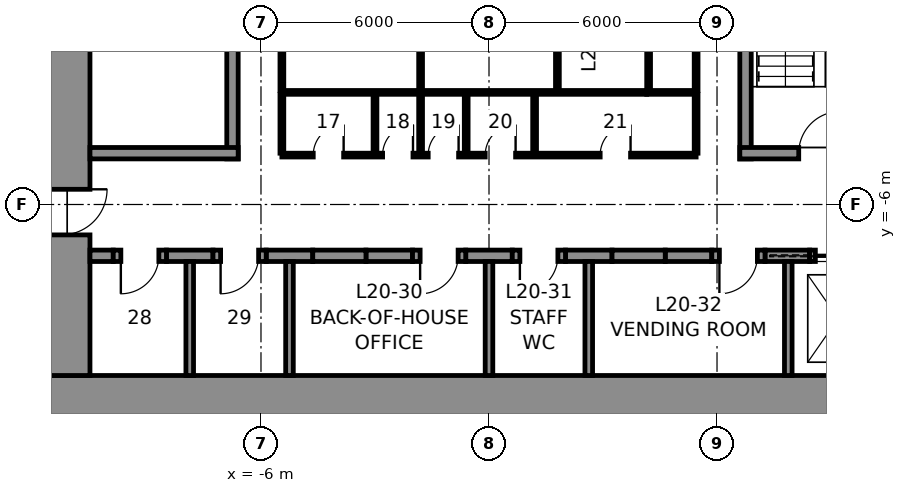
"""IFC4 building model, lengths in metres.
Left out: names, types, materials, properties, quantities, classifications, styles, units other than length and angle.
Written with IfcOpenShell. Run it as: python <this file> out.ifc"""

import sys

from ifc_helpers import new_model, si_unit, direction, frame, frame_2d, origin, place, context, subcontext, project, spatial, rectangle, extrude, element, fill, save


model = new_model("IFC4")
c1 = context("Model", 3, precision=1e-05, world=origin(), true_north=direction((0.0, 1.0)))
c2 = subcontext(c1, "Body", "Model", "MODEL_VIEW")
j1 = project(units=[si_unit("LENGTHUNIT", "METRE"), si_unit("PLANEANGLEUNIT", "RADIAN")], contexts=[c1])
p1 = place(None, origin())
s1 = spatial("IfcSite", under=j1, at=p1, CompositionType="ELEMENT")
p2 = place(p1, origin())
s2 = spatial("IfcBuilding", under=s1, at=p2, CompositionType="ELEMENT")
p3 = place(p2, frame((0.0, 0.0, 104.4)))
s3 = spatial("IfcBuildingStorey", under=s2, at=p3, CompositionType="ELEMENT", Elevation=104.4)
p4 = place(p3, frame((12.0, -11.25, 0.0), z_axis=(0.0, 0.0, 1.0), x_axis=(-1.0, 0.0, 0.0)))
e1 = element("IfcWall", 1, at=p4, inside=s3, PredefinedType="SHEAR", context=c2, shape_type="SweptSolid", body=[
    extrude(rectangle(XDim=24.0, YDim=1.5, at=frame_2d((12.0, 0.0))), origin(), (0.0, 0.0, 1.0), 4.6),
])
p5 = place(p3, frame((-11.25, -10.5, 0.0), z_axis=(0.0, 0.0, 1.0), x_axis=(0.0, 1.0, 0.0)))
e2 = element("IfcWall", 2, at=p5, inside=s3, PredefinedType="SHEAR", context=c2, shape_type="SweptSolid", body=[
    extrude(rectangle(XDim=21.0, YDim=1.5, at=frame_2d((10.5, 0.0))), origin(), (0.0, 0.0, 1.0), 4.6),
])
p6 = place(p5, frame((16.1, 0.0, 0.0)))
e3 = element("IfcOpeningElement", 3, at=p6, cuts=e2, PredefinedType="OPENING", context=c2, shape_type="SweptSolid", body=[
    extrude(rectangle(XDim=1.2, YDim=2.3, at=frame_2d((0.6, 1.15))), frame((0.0, 0.76, 0.0), z_axis=(0.0, -1.0, 0.0), x_axis=(1.0, 0.0, 0.0)), (0.0, 0.0, 1.0), 1.52),
])
p7 = place(p5, frame((3.7, 0.0, 0.0)))
e4 = element("IfcOpeningElement", 4, at=p7, cuts=e2, PredefinedType="OPENING", context=c2, shape_type="SweptSolid", body=[
    extrude(rectangle(XDim=1.2, YDim=2.3, at=frame_2d((0.6, 1.15))), frame((0.0, 0.76, 0.0), z_axis=(0.0, -1.0, 0.0), x_axis=(1.0, 0.0, 0.0)), (0.0, 0.0, 1.0), 1.52),
])
p8 = place(p3, frame((-10.5, -7.35, 0.0), z_axis=(0.0, 0.0, 1.0), x_axis=(1.0, 0.0, 0.0)))
e5 = element("IfcWall", 5, at=p8, inside=s3, PredefinedType="SHEAR", context=c2, shape_type="SweptSolid", body=[
    extrude(rectangle(XDim=0.613, YDim=0.3, at=frame_2d((0.306, 0.0))), origin(), (0.0, 0.0, 1.0), 4.6),
])
for number, where, z_axis, x_axis in (
    (6, (-8.488, -7.35, 0.0), (0.0, 0.0, 1.0), (1.0, 0.0, 0.0)),
    (7, (-5.863, -7.35, 0.0), (0.0, 0.0, 1.0), (1.0, 0.0, 0.0)),
    (8, (-3.238, -7.35, 0.0), (0.0, 0.0, 1.0), (1.0, 0.0, 0.0)),
    (9, (-0.613, -7.35, 0.0), (0.0, 0.0, 1.0), (1.0, 0.0, 0.0)),
    (10, (2.012, -7.35, 0.0), (0.0, 0.0, 1.0), (1.0, 0.0, 0.0)),
    (11, (4.637, -7.35, 0.0), (0.0, 0.0, 1.0), (1.0, 0.0, 0.0)),
):
    element("IfcWall", number, at=place(p3, frame(where, z_axis=z_axis, x_axis=x_axis)), inside=s3, PredefinedType="SHEAR", context=c2, shape_type="SweptSolid", body=[
        extrude(rectangle(XDim=1.225, YDim=0.3, at=frame_2d((0.613, 0.0))), origin(), (0.0, 0.0, 1.0), 4.6),
    ])
p9 = place(p3, frame((7.262, -7.35, 0.0), z_axis=(0.0, 0.0, 1.0), x_axis=(1.0, 0.0, 0.0)))
e12 = element("IfcWall", 12, at=p9, inside=s3, PredefinedType="SHEAR", context=c2, shape_type="SweptSolid", body=[
    extrude(rectangle(XDim=1.175, YDim=0.3, at=frame_2d((0.587, 0.0))), origin(), (0.0, 0.0, 1.0), 4.6),
])
p10 = place(p3, frame((-9.887, -7.35, 0.0), z_axis=(0.0, 0.0, 1.0), x_axis=(1.0, 0.0, 0.0)))
e13 = element("IfcWall", 13, at=p10, inside=s3, PredefinedType="PARTITIONING", context=c2, shape_type="SweptSolid", body=[
    extrude(rectangle(XDim=1.4, YDim=0.3, at=frame_2d((0.7, 0.0))), origin(), (0.0, 0.0, 1.0), 4.6),
])
p11 = place(p10, frame((0.2, 0.0, 0.0)))
e14 = element("IfcOpeningElement", 14, at=p11, cuts=e13, PredefinedType="OPENING", context=c2, shape_type="SweptSolid", body=[
    extrude(rectangle(XDim=1.0, YDim=2.3, at=frame_2d((0.5, 1.15))), frame((0.0, 0.16, 0.0), z_axis=(0.0, -1.0, 0.0), x_axis=(1.0, 0.0, 0.0)), (0.0, 0.0, 1.0), 0.32),
])
p12 = place(p3, frame((-7.262, -7.35, 0.0), z_axis=(0.0, 0.0, 1.0), x_axis=(1.0, 0.0, 0.0)))
e15 = element("IfcWall", 15, at=p12, inside=s3, PredefinedType="PARTITIONING", context=c2, shape_type="SweptSolid", body=[
    extrude(rectangle(XDim=1.4, YDim=0.3, at=frame_2d((0.7, 0.0))), origin(), (0.0, 0.0, 1.0), 4.6),
])
p13 = place(p12, frame((0.2, 0.0, 0.0)))
e16 = element("IfcOpeningElement", 16, at=p13, cuts=e15, PredefinedType="OPENING", context=c2, shape_type="SweptSolid", body=[
    extrude(rectangle(XDim=1.0, YDim=2.3, at=frame_2d((0.5, 1.15))), frame((0.0, 0.16, 0.0), z_axis=(0.0, -1.0, 0.0), x_axis=(1.0, 0.0, 0.0)), (0.0, 0.0, 1.0), 0.32),
])
p14 = place(p3, frame((-4.637, -7.35, 0.0), z_axis=(0.0, 0.0, 1.0), x_axis=(1.0, 0.0, 0.0)))
e17 = element("IfcWall", 17, at=p14, inside=s3, PredefinedType="PARTITIONING", context=c2, shape_type="SweptSolid", body=[
    extrude(rectangle(XDim=1.4, YDim=0.3, at=frame_2d((0.7, 0.0))), origin(), (0.0, 0.0, 1.0), 4.6),
])
p15 = place(p3, frame((-2.012, -7.35, 0.0), z_axis=(0.0, 0.0, 1.0), x_axis=(1.0, 0.0, 0.0)))
e18 = element("IfcWall", 18, at=p15, inside=s3, PredefinedType="PARTITIONING", context=c2, shape_type="SweptSolid", body=[
    extrude(rectangle(XDim=1.4, YDim=0.3, at=frame_2d((0.7, 0.0))), origin(), (0.0, 0.0, 1.0), 4.6),
])
p16 = place(p15, frame((0.2, 0.0, 0.0)))
e19 = element("IfcOpeningElement", 19, at=p16, cuts=e18, PredefinedType="OPENING", context=c2, shape_type="SweptSolid", body=[
    extrude(rectangle(XDim=1.0, YDim=2.3, at=frame_2d((0.5, 1.15))), frame((0.0, 0.16, 0.0), z_axis=(0.0, -1.0, 0.0), x_axis=(1.0, 0.0, 0.0)), (0.0, 0.0, 1.0), 0.32),
])
p17 = place(p3, frame((0.613, -7.35, 0.0), z_axis=(0.0, 0.0, 1.0), x_axis=(1.0, 0.0, 0.0)))
e20 = element("IfcWall", 20, at=p17, inside=s3, PredefinedType="PARTITIONING", context=c2, shape_type="SweptSolid", body=[
    extrude(rectangle(XDim=1.4, YDim=0.3, at=frame_2d((0.7, 0.0))), origin(), (0.0, 0.0, 1.0), 4.6),
])
p18 = place(p17, frame((0.2, 0.0, 0.0)))
e21 = element("IfcOpeningElement", 21, at=p18, cuts=e20, PredefinedType="OPENING", context=c2, shape_type="SweptSolid", body=[
    extrude(rectangle(XDim=1.0, YDim=2.3, at=frame_2d((0.5, 1.15))), frame((0.0, 0.16, 0.0), z_axis=(0.0, -1.0, 0.0), x_axis=(1.0, 0.0, 0.0)), (0.0, 0.0, 1.0), 0.32),
])
p19 = place(p3, frame((3.238, -7.35, 0.0), z_axis=(0.0, 0.0, 1.0), x_axis=(1.0, 0.0, 0.0)))
e22 = element("IfcWall", 22, at=p19, inside=s3, PredefinedType="PARTITIONING", context=c2, shape_type="SweptSolid", body=[
    extrude(rectangle(XDim=1.4, YDim=0.3, at=frame_2d((0.7, 0.0))), origin(), (0.0, 0.0, 1.0), 4.6),
])
p20 = place(p3, frame((5.863, -7.35, 0.0), z_axis=(0.0, 0.0, 1.0), x_axis=(1.0, 0.0, 0.0)))
e23 = element("IfcWall", 23, at=p20, inside=s3, PredefinedType="PARTITIONING", context=c2, shape_type="SweptSolid", body=[
    extrude(rectangle(XDim=1.4, YDim=0.3, at=frame_2d((0.7, 0.0))), origin(), (0.0, 0.0, 1.0), 4.6),
])
p21 = place(p20, frame((0.2, 0.0, 0.0)))
e24 = element("IfcOpeningElement", 24, at=p21, cuts=e23, PredefinedType="OPENING", context=c2, shape_type="SweptSolid", body=[
    extrude(rectangle(XDim=1.0, YDim=2.3, at=frame_2d((0.5, 1.15))), frame((0.0, 0.16, 0.0), z_axis=(0.0, -1.0, 0.0), x_axis=(1.0, 0.0, 0.0)), (0.0, 0.0, 1.0), 0.32),
])
p22 = place(p3, frame((8.438, -7.35, 0.0), z_axis=(0.0, 0.0, 1.0), x_axis=(1.0, 0.0, 0.0)))
e25 = element("IfcWall", 25, at=p22, inside=s3, PredefinedType="PARTITIONING", context=c2, shape_type="SweptSolid", body=[
    extrude(rectangle(XDim=1.5, YDim=0.3, at=frame_2d((0.75, 0.0))), origin(), (0.0, 0.0, 1.0), 4.6),
])
p23 = place(p22, frame((0.15, 0.0, 0.0)))
e26 = element("IfcOpeningElement", 26, at=p23, cuts=e25, PredefinedType="OPENING", context=c2, shape_type="SweptSolid", body=[
    extrude(rectangle(XDim=1.2, YDim=2.3, at=frame_2d((0.6, 1.15))), frame((0.0, 0.16, 0.0), z_axis=(0.0, -1.0, 0.0), x_axis=(1.0, 0.0, 0.0)), (0.0, 0.0, 1.0), 0.32),
])
for number, where, z_axis, x_axis in (
    (27, (-7.875, -10.5, 0.0), (0.0, 0.0, 1.0), (0.0, 1.0, 0.0)),
    (28, (-5.25, -10.5, 0.0), (0.0, 0.0, 1.0), (0.0, 1.0, 0.0)),
    (29, (0.0, -10.5, 0.0), (0.0, 0.0, 1.0), (0.0, 1.0, 0.0)),
    (30, (2.625, -10.5, 0.0), (0.0, 0.0, 1.0), (0.0, 1.0, 0.0)),
    (31, (7.875, -10.5, 0.0), (0.0, 0.0, 1.0), (0.0, 1.0, 0.0)),
):
    element("IfcWall", number, at=place(p3, frame(where, z_axis=z_axis, x_axis=x_axis)), inside=s3, PredefinedType="PARTITIONING", context=c2, shape_type="SweptSolid", body=[
        extrude(rectangle(XDim=3.0, YDim=0.2, at=frame_2d((1.5, 0.0))), origin(), (0.0, 0.0, 1.0), 4.6),
    ])
p24 = place(p3, frame((-6.75, -4.8, 0.0), z_axis=(0.0, 0.0, 1.0), x_axis=(0.0, 1.0, 0.0)))
e32 = element("IfcWall", 32, at=p24, inside=s3, PredefinedType="SOLIDWALL", context=c2, shape_type="SweptSolid", body=[
    extrude(rectangle(XDim=9.6, YDim=0.3, at=frame_2d((4.8, 0.0))), origin(), (0.0, 0.0, 1.0), 4.35),
])
p25 = place(p3, frame((-6.6, -4.65, 0.0), z_axis=(0.0, 0.0, 1.0), x_axis=(-1.0, 0.0, 0.0)))
e33 = element("IfcWall", 33, at=p25, inside=s3, PredefinedType="SOLIDWALL", context=c2, shape_type="SweptSolid", body=[
    extrude(rectangle(XDim=3.9, YDim=0.3, at=frame_2d((1.95, 0.0))), origin(), (0.0, 0.0, 1.0), 4.35),
])
p26 = place(p3, frame((6.75, -4.8, 0.0), z_axis=(0.0, 0.0, 1.0), x_axis=(0.0, 1.0, 0.0)))
e34 = element("IfcWall", 34, at=p26, inside=s3, PredefinedType="SOLIDWALL", context=c2, shape_type="SweptSolid", body=[
    extrude(rectangle(XDim=9.6, YDim=0.3, at=frame_2d((4.8, 0.0))), origin(), (0.0, 0.0, 1.0), 4.35),
])
p27 = place(p3, frame((10.5, -4.65, 0.0), z_axis=(0.0, 0.0, 1.0), x_axis=(-1.0, 0.0, 0.0)))
e35 = element("IfcWall", 35, at=p27, inside=s3, PredefinedType="SOLIDWALL", context=c2, shape_type="SweptSolid", body=[
    extrude(rectangle(XDim=3.9, YDim=0.3, at=frame_2d((1.95, 0.0))), origin(), (0.0, 0.0, 1.0), 4.35),
])
p28 = place(p27, frame((1.25, 0.0, 0.0)))
e36 = element("IfcOpeningElement", 36, at=p28, cuts=e35, PredefinedType="OPENING", context=c2, shape_type="SweptSolid", body=[
    extrude(rectangle(XDim=1.1, YDim=2.3, at=frame_2d((0.55, 1.15))), frame((0.0, 0.16, 0.0), z_axis=(0.0, -1.0, 0.0), x_axis=(1.0, 0.0, 0.0)), (0.0, 0.0, 1.0), 0.32),
])
p29 = place(p3, frame((4.15, -3.05, 0.0), z_axis=(0.0, 0.0, 1.0), x_axis=(-1.0, 0.0, 0.0)))
e37 = element("IfcWall", 37, at=p29, inside=s3, PredefinedType="PARTITIONING", context=c2, shape_type="SweptSolid", body=[
    extrude(rectangle(XDim=9.6, YDim=0.1, at=frame_2d((4.8, 0.0))), origin(), (0.0, 0.0, 1.0), 4.35),
])
p30 = place(p3, frame((5.45, -3.05, 0.0), z_axis=(0.0, 0.0, 1.0), x_axis=(-1.0, 0.0, 0.0)))
e38 = element("IfcWall", 38, at=p30, inside=s3, PredefinedType="PARTITIONING", context=c2, shape_type="SweptSolid", body=[
    extrude(rectangle(XDim=1.3, YDim=0.1, at=frame_2d((0.65, 0.0))), origin(), (0.0, 0.0, 1.0), 4.35),
])
for number, where, z_axis, x_axis in (
    (39, (5.45, 3.0, 0.0), (0.0, 0.0, 1.0), (0.0, -1.0, 0.0)),
    (40, (-5.45, -3.0, 0.0), (0.0, 0.0, 1.0), (0.0, 1.0, 0.0)),
    (41, (-1.8, -3.0, 0.0), (0.0, 0.0, 1.0), (0.0, 1.0, 0.0)),
    (42, (1.8, -3.0, 0.0), (0.0, 0.0, 1.0), (0.0, 1.0, 0.0)),
    (43, (4.2, -3.0, 0.0), (0.0, 0.0, 1.0), (0.0, 1.0, 0.0)),
):
    element("IfcWall", number, at=place(p3, frame(where, z_axis=z_axis, x_axis=x_axis)), inside=s3, PredefinedType="PARTITIONING", context=c2, shape_type="SweptSolid", body=[
        extrude(rectangle(XDim=6.0, YDim=0.1, at=frame_2d((3.0, 0.0))), origin(), (0.0, 0.0, 1.0), 4.35),
    ])
p31 = place(p3, frame((5.45, -4.7, 0.0), z_axis=(0.0, 0.0, 1.0), x_axis=(-1.0, 0.0, 0.0)))
e44 = element("IfcWall", 44, at=p31, inside=s3, PredefinedType="PARTITIONING", context=c2, shape_type="SweptSolid", body=[
    extrude(rectangle(XDim=10.9, YDim=0.1, at=frame_2d((5.45, 0.0))), origin(), (0.0, 0.0, 1.0), 4.35),
])
p32 = place(p31, frame((9.275, 0.0, 0.0)))
e45 = element("IfcOpeningElement", 45, at=p32, cuts=e44, PredefinedType="OPENING", context=c2, shape_type="SweptSolid", body=[
    extrude(rectangle(XDim=0.8, YDim=2.3, at=frame_2d((0.4, 1.15))), frame((0.0, 0.06, 0.0), z_axis=(0.0, -1.0, 0.0), x_axis=(1.0, 0.0, 0.0)), (0.0, 0.0, 1.0), 0.12),
])
p33 = place(p31, frame((7.45, 0.0, 0.0)))
e46 = element("IfcOpeningElement", 46, at=p33, cuts=e44, PredefinedType="OPENING", context=c2, shape_type="SweptSolid", body=[
    extrude(rectangle(XDim=0.8, YDim=2.3, at=frame_2d((0.4, 1.15))), frame((0.0, 0.06, 0.0), z_axis=(0.0, -1.0, 0.0), x_axis=(1.0, 0.0, 0.0)), (0.0, 0.0, 1.0), 0.12),
])
p34 = place(p31, frame((6.25, 0.0, 0.0)))
e47 = element("IfcOpeningElement", 47, at=p34, cuts=e44, PredefinedType="OPENING", context=c2, shape_type="SweptSolid", body=[
    extrude(rectangle(XDim=0.8, YDim=2.3, at=frame_2d((0.4, 1.15))), frame((0.0, 0.06, 0.0), z_axis=(0.0, -1.0, 0.0), x_axis=(1.0, 0.0, 0.0)), (0.0, 0.0, 1.0), 0.12),
])
p35 = place(p31, frame((4.75, 0.0, 0.0)))
e48 = element("IfcOpeningElement", 48, at=p35, cuts=e44, PredefinedType="OPENING", context=c2, shape_type="SweptSolid", body=[
    extrude(rectangle(XDim=0.8, YDim=2.3, at=frame_2d((0.4, 1.15))), frame((0.0, 0.06, 0.0), z_axis=(0.0, -1.0, 0.0), x_axis=(1.0, 0.0, 0.0)), (0.0, 0.0, 1.0), 0.12),
])
p36 = place(p31, frame((1.725, 0.0, 0.0)))
e49 = element("IfcOpeningElement", 49, at=p36, cuts=e44, PredefinedType="OPENING", context=c2, shape_type="SweptSolid", body=[
    extrude(rectangle(XDim=0.8, YDim=2.3, at=frame_2d((0.4, 1.15))), frame((0.0, 0.06, 0.0), z_axis=(0.0, -1.0, 0.0), x_axis=(1.0, 0.0, 0.0)), (0.0, 0.0, 1.0), 0.12),
])
for number, where, z_axis, x_axis in (
    (50, (-5.45, -3.1, 0.0), (0.0, 0.0, 1.0), (0.0, -1.0, 0.0)),
    (51, (5.45, -3.1, 0.0), (0.0, 0.0, 1.0), (0.0, -1.0, 0.0)),
    (52, (-3.0, -3.1, 0.0), (0.0, 0.0, 1.0), (0.0, -1.0, 0.0)),
    (53, (-1.8, -3.1, 0.0), (0.0, 0.0, 1.0), (0.0, -1.0, 0.0)),
    (54, (-0.6, -3.1, 0.0), (0.0, 0.0, 1.0), (0.0, -1.0, 0.0)),
    (55, (1.2, -3.1, 0.0), (0.0, 0.0, 1.0), (0.0, -1.0, 0.0)),
):
    element("IfcWall", number, at=place(p3, frame(where, z_axis=z_axis, x_axis=x_axis)), inside=s3, PredefinedType="PARTITIONING", context=c2, shape_type="SweptSolid", body=[
        extrude(rectangle(XDim=1.55, YDim=0.1, at=frame_2d((0.775, 0.0))), origin(), (0.0, 0.0, 1.0), 4.35),
    ])
p37 = place(p28, frame((1.1, 0.0, 0.0), z_axis=(0.0, 0.0, 1.0), x_axis=(-1.0, 0.0, 0.0)))
e56 = element("IfcDoor", 56, at=p37, inside=s3, OperationType="SINGLE_SWING_RIGHT", PredefinedType="DOOR", context=c2, shape_type="SweptSolid", body=[
    extrude(rectangle(XDim=1.1, YDim=2.3, at=frame_2d((0.55, 1.15))), frame((0.0, 0.025, 0.0), z_axis=(0.0, -1.0, 0.0), x_axis=(1.0, 0.0, 0.0)), (0.0, 0.0, 1.0), 0.05),
])
fill(e36, e56)
p38 = place(p32, frame((0.8, 0.0, 0.0), z_axis=(0.0, 0.0, 1.0), x_axis=(-1.0, 0.0, 0.0)))
e57 = element("IfcDoor", 57, at=p38, inside=s3, OperationType="SINGLE_SWING_RIGHT", PredefinedType="DOOR", context=c2, shape_type="SweptSolid", body=[
    extrude(rectangle(XDim=0.8, YDim=2.3, at=frame_2d((0.4, 1.15))), frame((0.0, 0.025, 0.0), z_axis=(0.0, -1.0, 0.0), x_axis=(1.0, 0.0, 0.0)), (0.0, 0.0, 1.0), 0.05),
])
fill(e45, e57)
p39 = place(p33, frame((0.8, 0.0, 0.0), z_axis=(0.0, 0.0, 1.0), x_axis=(-1.0, 0.0, 0.0)))
e58 = element("IfcDoor", 58, at=p39, inside=s3, OperationType="SINGLE_SWING_RIGHT", PredefinedType="DOOR", context=c2, shape_type="SweptSolid", body=[
    extrude(rectangle(XDim=0.8, YDim=2.3, at=frame_2d((0.4, 1.15))), frame((0.0, 0.025, 0.0), z_axis=(0.0, -1.0, 0.0), x_axis=(1.0, 0.0, 0.0)), (0.0, 0.0, 1.0), 0.05),
])
fill(e46, e58)
p40 = place(p34, frame((0.8, 0.0, 0.0), z_axis=(0.0, 0.0, 1.0), x_axis=(-1.0, 0.0, 0.0)))
e59 = element("IfcDoor", 59, at=p40, inside=s3, OperationType="SINGLE_SWING_RIGHT", PredefinedType="DOOR", context=c2, shape_type="SweptSolid", body=[
    extrude(rectangle(XDim=0.8, YDim=2.3, at=frame_2d((0.4, 1.15))), frame((0.0, 0.025, 0.0), z_axis=(0.0, -1.0, 0.0), x_axis=(1.0, 0.0, 0.0)), (0.0, 0.0, 1.0), 0.05),
])
fill(e47, e59)
p41 = place(p35, frame((0.8, 0.0, 0.0), z_axis=(0.0, 0.0, 1.0), x_axis=(-1.0, 0.0, 0.0)))
e60 = element("IfcDoor", 60, at=p41, inside=s3, OperationType="SINGLE_SWING_RIGHT", PredefinedType="DOOR", context=c2, shape_type="SweptSolid", body=[
    extrude(rectangle(XDim=0.8, YDim=2.3, at=frame_2d((0.4, 1.15))), frame((0.0, 0.025, 0.0), z_axis=(0.0, -1.0, 0.0), x_axis=(1.0, 0.0, 0.0)), (0.0, 0.0, 1.0), 0.05),
])
fill(e48, e60)
p42 = place(p36, frame((0.8, 0.0, 0.0), z_axis=(0.0, 0.0, 1.0), x_axis=(-1.0, 0.0, 0.0)))
e61 = element("IfcDoor", 61, at=p42, inside=s3, OperationType="SINGLE_SWING_RIGHT", PredefinedType="DOOR", context=c2, shape_type="SweptSolid", body=[
    extrude(rectangle(XDim=0.8, YDim=2.3, at=frame_2d((0.4, 1.15))), frame((0.0, 0.025, 0.0), z_axis=(0.0, -1.0, 0.0), x_axis=(1.0, 0.0, 0.0)), (0.0, 0.0, 1.0), 0.05),
])
fill(e49, e61)
p43 = place(p11, frame((1.0, 0.0, 0.0), z_axis=(0.0, 0.0, 1.0), x_axis=(-1.0, 0.0, 0.0)))
e62 = element("IfcDoor", 62, at=p43, inside=s3, OperationType="SINGLE_SWING_RIGHT", PredefinedType="DOOR", context=c2, shape_type="SweptSolid", body=[
    extrude(rectangle(XDim=1.0, YDim=2.3, at=frame_2d((0.5, 1.15))), frame((0.0, 0.025, 0.0), z_axis=(0.0, -1.0, 0.0), x_axis=(1.0, 0.0, 0.0)), (0.0, 0.0, 1.0), 0.05),
])
fill(e14, e62)
p44 = place(p13, frame((1.0, 0.0, 0.0), z_axis=(0.0, 0.0, 1.0), x_axis=(-1.0, 0.0, 0.0)))
e63 = element("IfcDoor", 63, at=p44, inside=s3, OperationType="SINGLE_SWING_RIGHT", PredefinedType="DOOR", context=c2, shape_type="SweptSolid", body=[
    extrude(rectangle(XDim=1.0, YDim=2.3, at=frame_2d((0.5, 1.15))), frame((0.0, 0.025, 0.0), z_axis=(0.0, -1.0, 0.0), x_axis=(1.0, 0.0, 0.0)), (0.0, 0.0, 1.0), 0.05),
])
fill(e16, e63)
p45 = place(p16, frame((1.0, 0.0, 0.0), z_axis=(0.0, 0.0, 1.0), x_axis=(-1.0, 0.0, 0.0)))
e64 = element("IfcDoor", 64, at=p45, inside=s3, OperationType="SINGLE_SWING_RIGHT", PredefinedType="DOOR", context=c2, shape_type="SweptSolid", body=[
    extrude(rectangle(XDim=1.0, YDim=2.3, at=frame_2d((0.5, 1.15))), frame((0.0, 0.025, 0.0), z_axis=(0.0, -1.0, 0.0), x_axis=(1.0, 0.0, 0.0)), (0.0, 0.0, 1.0), 0.05),
])
fill(e19, e64)
p46 = place(p18, frame((1.0, 0.0, 0.0), z_axis=(0.0, 0.0, 1.0), x_axis=(-1.0, 0.0, 0.0)))
e65 = element("IfcDoor", 65, at=p46, inside=s3, OperationType="SINGLE_SWING_RIGHT", PredefinedType="DOOR", context=c2, shape_type="SweptSolid", body=[
    extrude(rectangle(XDim=1.0, YDim=2.3, at=frame_2d((0.5, 1.15))), frame((0.0, 0.025, 0.0), z_axis=(0.0, -1.0, 0.0), x_axis=(1.0, 0.0, 0.0)), (0.0, 0.0, 1.0), 0.05),
])
fill(e21, e65)
p47 = place(p21, frame((1.0, 0.0, 0.0), z_axis=(0.0, 0.0, 1.0), x_axis=(-1.0, 0.0, 0.0)))
e66 = element("IfcDoor", 66, at=p47, inside=s3, OperationType="SINGLE_SWING_RIGHT", PredefinedType="DOOR", context=c2, shape_type="SweptSolid", body=[
    extrude(rectangle(XDim=1.0, YDim=2.3, at=frame_2d((0.5, 1.15))), frame((0.0, 0.025, 0.0), z_axis=(0.0, -1.0, 0.0), x_axis=(1.0, 0.0, 0.0)), (0.0, 0.0, 1.0), 0.05),
])
fill(e24, e66)
p48 = place(p7, frame((1.2, 0.0, 0.0), z_axis=(0.0, 0.0, 1.0), x_axis=(-1.0, 0.0, 0.0)))
e67 = element("IfcDoor", 67, at=p48, inside=s3, OperationType="SINGLE_SWING_LEFT", PredefinedType="DOOR", context=c2, shape_type="SweptSolid", body=[
    extrude(rectangle(XDim=1.2, YDim=2.3, at=frame_2d((0.6, 1.15))), frame((0.0, 0.025, 0.0), z_axis=(0.0, -1.0, 0.0), x_axis=(1.0, 0.0, 0.0)), (0.0, 0.0, 1.0), 0.05),
])
fill(e4, e67)
p49 = place(p23, origin())
e68 = element("IfcDoor", 68, at=p49, inside=s3, OperationType="SLIDING_TO_LEFT", PredefinedType="DOOR", context=c2, shape_type="SweptSolid", body=[
    extrude(rectangle(XDim=1.2, YDim=2.3, at=frame_2d((0.6, 1.15))), frame((0.0, 0.025, 0.0), z_axis=(0.0, -1.0, 0.0), x_axis=(1.0, 0.0, 0.0)), (0.0, 0.0, 1.0), 0.05),
])
fill(e26, e68)
save(model, sys.argv[1])
